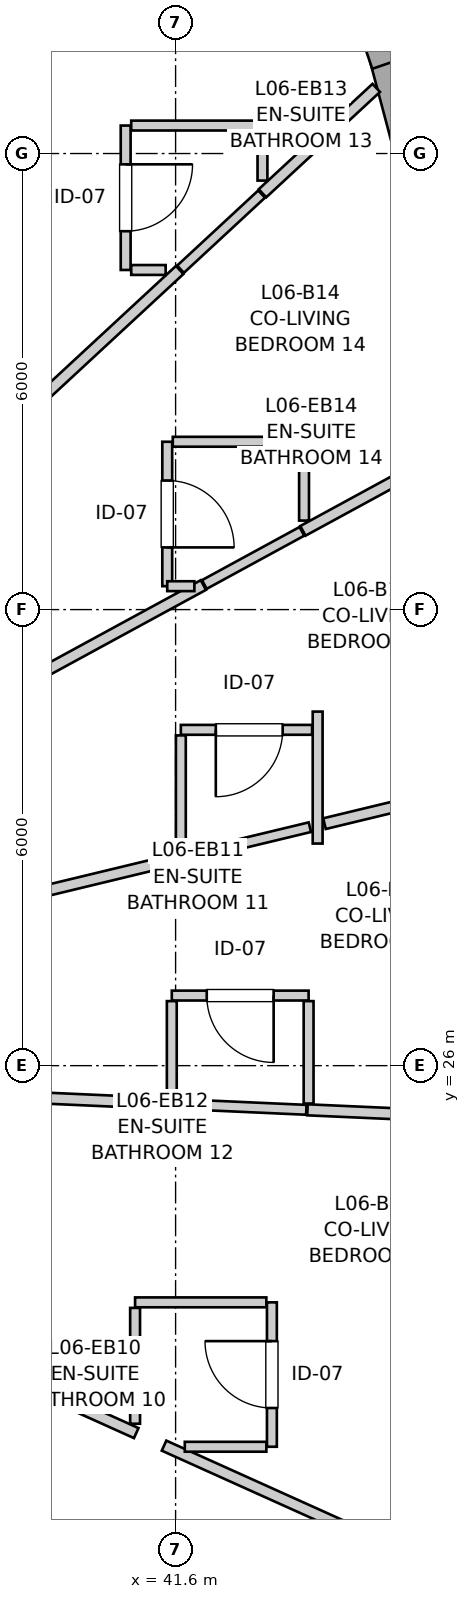
"""IFC4 building model, lengths in metres.
Left out: names, types, materials, properties, quantities, classifications, styles, units other than length and angle.
Written with IfcOpenShell. Run it as: python <this file> out.ifc"""

import sys

from ifc_helpers import new_model, si_unit, direction, frame, frame_2d, origin, place, context, subcontext, project, spatial, rectangle, extrude, source, transform, mapped, element, fill, save


model = new_model("IFC4")
c1 = context("Model", 3, precision=1e-05, world=origin(), true_north=direction((0.0, 1.0)))
c2 = subcontext(c1, "Body", "Model", "MODEL_VIEW")
j1 = project(units=[si_unit("LENGTHUNIT", "METRE"), si_unit("PLANEANGLEUNIT", "RADIAN")], contexts=[c1])
p1 = place(None, origin())
s1 = spatial("IfcSite", under=j1, at=p1, CompositionType="ELEMENT")
p2 = place(p1, origin())
s2 = spatial("IfcBuilding", under=s1, at=p2, CompositionType="ELEMENT")
p3 = place(p2, frame((0.0, 0.0, 23.8)))
s3 = spatial("IfcBuildingStorey", under=s2, at=p3, CompositionType="ELEMENT", Elevation=23.8)
p4 = place(p3, frame((45.214, 35.922, 0.0), z_axis=(0.0, 0.0, 1.0), x_axis=(-0.257081073508, 0.966389839373, 0.0)))
e1 = element("IfcWall", 1, at=p4, inside=s3, PredefinedType="SOLIDWALL", context=c2, shape_type="SweptSolid", body=[
    extrude(rectangle(XDim=3.449, YDim=0.35, at=frame_2d((1.725, 0.0))), origin(), (0.0, 0.0, 1.0), 2.415),
])
p5 = place(p4, frame((0.857, 0.0, 0.82)))
e2 = element("IfcOpeningElement", 2, at=p5, cuts=e1, PredefinedType="OPENING", context=c2, shape_type="SweptSolid", body=[
    extrude(rectangle(XDim=1.45, YDim=1.25, at=frame_2d((0.725, 0.625))), frame((0.0, 0.185, 0.0), z_axis=(0.0, -1.0, 0.0), x_axis=(1.0, 0.0, 0.0)), (0.0, 0.0, 1.0), 0.37),
])
p6 = place(p3, frame((44.353, 39.171, 0.0), z_axis=(0.0, 0.0, 1.0), x_axis=(-0.323604310653, 0.946192501623, 0.0)))
e3 = element("IfcWall", 3, at=p6, inside=s3, PredefinedType="SOLIDWALL", context=c2, shape_type="SweptSolid", body=[
    extrude(rectangle(XDim=3.243, YDim=0.35, at=frame_2d((1.621, 0.0))), origin(), (0.0, 0.0, 1.0), 2.415),
])
p7 = place(p6, frame((0.901, 0.0, 0.82)))
e4 = element("IfcOpeningElement", 4, at=p7, cuts=e3, PredefinedType="OPENING", context=c2, shape_type="SweptSolid", body=[
    extrude(rectangle(XDim=1.45, YDim=1.25, at=frame_2d((0.725, 0.625))), frame((0.0, 0.185, 0.0), z_axis=(0.0, -1.0, 0.0), x_axis=(1.0, 0.0, 0.0)), (0.0, 0.0, 1.0), 0.37),
])
p8 = place(p3, frame((42.867, 20.986, 0.0), z_axis=(0.0, 0.0, 1.0), x_axis=(0.0, 1.0, 0.0)))
e5 = element("IfcWall", 5, at=p8, inside=s3, PredefinedType="PARTITIONING", context=c2, shape_type="SweptSolid", body=[
    extrude(rectangle(XDim=1.9, YDim=0.13, at=frame_2d((0.95, 0.0))), origin(), (0.0, 0.0, 1.0), 2.503),
])
p9 = place(p8, frame((0.51, 0.0, 0.0)))
e6 = element("IfcOpeningElement", 6, at=p9, cuts=e5, PredefinedType="OPENING", context=c2, shape_type="SweptSolid", body=[
    extrude(rectangle(XDim=0.88, YDim=2.05, at=frame_2d((0.44, 1.025))), frame((0.0, 0.075, 0.0), z_axis=(0.0, -1.0, 0.0), x_axis=(1.0, 0.0, 0.0)), (0.0, 0.0, 1.0), 0.15),
])
p10 = place(p3, frame((40.943, 38.368, 0.0), z_axis=(0.0, 0.0, 1.0), x_axis=(0.0, -1.0, 0.0)))
e7 = element("IfcWall", 7, at=p10, inside=s3, PredefinedType="PARTITIONING", context=c2, shape_type="SweptSolid", body=[
    extrude(rectangle(XDim=1.9, YDim=0.13, at=frame_2d((0.95, 0.0))), origin(), (0.0, 0.0, 1.0), 2.935),
])
p11 = place(p10, frame((0.51, 0.0, 0.0)))
e8 = element("IfcOpeningElement", 8, at=p11, cuts=e7, PredefinedType="OPENING", context=c2, shape_type="SweptSolid", body=[
    extrude(rectangle(XDim=0.88, YDim=2.05, at=frame_2d((0.44, 1.025))), frame((0.0, 0.075, 0.0), z_axis=(0.0, -1.0, 0.0), x_axis=(1.0, 0.0, 0.0)), (0.0, 0.0, 1.0), 0.15),
])
p12 = place(p3, frame((41.49, 34.208, 0.0), z_axis=(0.0, 0.0, 1.0), x_axis=(0.0, -1.0, 0.0)))
e9 = element("IfcWall", 9, at=p12, inside=s3, PredefinedType="PARTITIONING", context=c2, shape_type="SweptSolid", body=[
    extrude(rectangle(XDim=1.9, YDim=0.13, at=frame_2d((0.95, 0.0))), origin(), (0.0, 0.0, 1.0), 2.935),
])
p13 = place(p12, frame((0.51, 0.0, 0.0)))
e10 = element("IfcOpeningElement", 10, at=p13, cuts=e9, PredefinedType="OPENING", context=c2, shape_type="SweptSolid", body=[
    extrude(rectangle(XDim=0.88, YDim=2.05, at=frame_2d((0.44, 1.025))), frame((0.0, 0.075, 0.0), z_axis=(0.0, -1.0, 0.0), x_axis=(1.0, 0.0, 0.0)), (0.0, 0.0, 1.0), 0.15),
])
p14 = place(p3, frame((43.396, 30.418, 0.0), z_axis=(0.0, 0.0, 1.0), x_axis=(-1.0, 0.0, 0.0)))
e11 = element("IfcWall", 11, at=p14, inside=s3, PredefinedType="PARTITIONING", context=c2, shape_type="SweptSolid", body=[
    extrude(rectangle(XDim=1.727, YDim=0.13, at=frame_2d((0.864, 0.0))), origin(), (0.0, 0.0, 1.0), 2.935),
])
p15 = place(p14, frame((0.387, 0.0, 0.0)))
e12 = element("IfcOpeningElement", 12, at=p15, cuts=e11, PredefinedType="OPENING", context=c2, shape_type="SweptSolid", body=[
    extrude(rectangle(XDim=0.88, YDim=2.05, at=frame_2d((0.44, 1.025))), frame((0.0, 0.075, 0.0), z_axis=(0.0, -1.0, 0.0), x_axis=(1.0, 0.0, 0.0)), (0.0, 0.0, 1.0), 0.15),
])
p16 = place(p3, frame((43.35, 26.922, 0.0), z_axis=(0.0, 0.0, 1.0), x_axis=(-1.0, 0.0, 0.0)))
e13 = element("IfcWall", 13, at=p16, inside=s3, PredefinedType="PARTITIONING", context=c2, shape_type="SweptSolid", body=[
    extrude(rectangle(XDim=1.8, YDim=0.13, at=frame_2d((0.9, 0.0))), origin(), (0.0, 0.0, 1.0), 2.935),
])
p17 = place(p16, frame((0.46, 0.0, 0.0)))
e14 = element("IfcOpeningElement", 14, at=p17, cuts=e13, PredefinedType="OPENING", context=c2, shape_type="SweptSolid", body=[
    extrude(rectangle(XDim=0.88, YDim=2.05, at=frame_2d((0.44, 1.025))), frame((0.0, 0.075, 0.0), z_axis=(0.0, -1.0, 0.0), x_axis=(1.0, 0.0, 0.0)), (0.0, 0.0, 1.0), 0.15),
])
p18 = place(p3, frame((35.852, 36.7, 0.0), z_axis=(0.0, 0.0, 1.0), x_axis=(0.457258091214, 0.889334041865, 0.0)))
e15 = element("IfcWall", 15, at=p18, inside=s3, PredefinedType="PARTITIONING", context=c2, shape_type="SweptSolid", body=[
    extrude(rectangle(XDim=11.227, YDim=0.145, at=frame_2d((5.613, 0.0))), origin(), (0.0, 0.0, 1.0), 2.935),
])
p19 = place(p3, frame((37.943, 36.708, 0.0), z_axis=(0.0, 0.0, 1.0), x_axis=(0.578429476704, 0.81573239514, 0.0)))
e16 = element("IfcWall", 16, at=p19, inside=s3, PredefinedType="PARTITIONING", context=c2, shape_type="SweptSolid", body=[
    extrude(rectangle(XDim=8.447, YDim=0.145, at=frame_2d((4.223, 0.0))), origin(), (0.0, 0.0, 1.0), 2.935),
])
p20 = place(p3, frame((41.448, 21.001, 0.0), z_axis=(0.0, 0.0, 1.0), x_axis=(0.911733501253, -0.410782208346, 0.0)))
e17 = element("IfcWall", 17, at=p20, inside=s3, PredefinedType="PARTITIONING", context=c2, shape_type="SweptSolid", body=[
    extrude(rectangle(XDim=4.546, YDim=0.145, at=frame_2d((2.273, 0.0))), origin(), (0.0, 0.0, 1.0), 2.103),
])
p21 = place(p3, frame((38.815, 33.839, 0.0), z_axis=(0.0, 0.0, 1.0), x_axis=(0.733718730688, 0.67945332749, 0.0)))
e18 = element("IfcWall", 18, at=p21, inside=s3, PredefinedType="PARTITIONING", context=c2, shape_type="SweptSolid", body=[
    extrude(rectangle(XDim=3.869, YDim=0.145, at=frame_2d((1.935, 0.0))), origin(), (0.0, 0.0, 1.0), 2.935),
])
p22 = place(p3, frame((38.802, 30.601, 0.0), z_axis=(0.0, 0.0, 1.0), x_axis=(0.878335610987, 0.478044510973, 0.0)))
e19 = element("IfcWall", 19, at=p22, inside=s3, PredefinedType="PARTITIONING", context=c2, shape_type="SweptSolid", body=[
    extrude(rectangle(XDim=3.602, YDim=0.145, at=frame_2d((1.801, 0.0))), origin(), (0.0, 0.0, 1.0), 2.103),
])
p23 = place(p3, frame((38.785, 28.033, 0.0), z_axis=(0.0, 0.0, 1.0), x_axis=(0.972108739033, 0.234530593943, 0.0)))
e20 = element("IfcWall", 20, at=p23, inside=s3, PredefinedType="PARTITIONING", context=c2, shape_type="SweptSolid", body=[
    extrude(rectangle(XDim=2.967, YDim=0.145, at=frame_2d((1.483, 0.0))), origin(), (0.0, 0.0, 1.0), 2.935),
])
p24 = place(p3, frame((38.771, 25.623, 0.0), z_axis=(0.0, 0.0, 1.0), x_axis=(0.999004404192, -0.044611662199, 0.0)))
e21 = element("IfcWall", 21, at=p24, inside=s3, PredefinedType="PARTITIONING", context=c2, shape_type="SweptSolid", body=[
    extrude(rectangle(XDim=2.796, YDim=0.145, at=frame_2d((1.398, 0.0))), origin(), (0.0, 0.0, 1.0), 2.935),
])
p25 = place(p3, frame((43.335, 25.419, 0.0), z_axis=(0.0, 0.0, 1.0), x_axis=(0.999002708223, -0.04464962444, 0.0)))
e22 = element("IfcWall", 22, at=p25, inside=s3, PredefinedType="PARTITIONING", context=c2, shape_type="SweptSolid", body=[
    extrude(rectangle(XDim=2.805, YDim=0.145, at=frame_2d((1.402, 0.0))), origin(), (0.0, 0.0, 1.0), 2.935),
])
p26 = place(p3, frame((38.797, 22.195, 0.0), z_axis=(0.0, 0.0, 1.0), x_axis=(0.911759201305, -0.410725162165, 0.0)))
e23 = element("IfcWall", 23, at=p26, inside=s3, PredefinedType="PARTITIONING", context=c2, shape_type="SweptSolid", body=[
    extrude(rectangle(XDim=2.506, YDim=0.145, at=frame_2d((1.253, 0.0))), origin(), (0.0, 0.0, 1.0), 2.935),
])
p27 = place(p3, frame((43.559, 29.184, 0.0), z_axis=(0.0, 0.0, 1.0), x_axis=(0.972124665715, 0.23446456941, 0.0)))
e24 = element("IfcWall", 24, at=p27, inside=s3, PredefinedType="PARTITIONING", context=c2, shape_type="SweptSolid", body=[
    extrude(rectangle(XDim=2.487, YDim=0.145, at=frame_2d((1.243, 0.0))), origin(), (0.0, 0.0, 1.0), 2.935),
])
p28 = place(p3, frame((43.275, 33.036, 0.0), z_axis=(0.0, 0.0, 1.0), x_axis=(0.878237509553, 0.478224713721, 0.0)))
e25 = element("IfcWall", 25, at=p28, inside=s3, PredefinedType="PARTITIONING", context=c2, shape_type="SweptSolid", body=[
    extrude(rectangle(XDim=2.372, YDim=0.145, at=frame_2d((1.186, 0.0))), origin(), (0.0, 0.0, 1.0), 2.935),
])
p29 = place(p3, frame((42.743, 37.477, 0.0), z_axis=(0.0, 0.0, 1.0), x_axis=(0.73374741774, 0.679422347999, 0.0)))
e26 = element("IfcWall", 26, at=p29, inside=s3, PredefinedType="PARTITIONING", context=c2, shape_type="SweptSolid", body=[
    extrude(rectangle(XDim=2.04, YDim=0.145, at=frame_2d((1.02, 0.0))), origin(), (0.0, 0.0, 1.0), 2.935),
])
p30 = place(p3, frame((41.684, 28.732, 0.0), z_axis=(0.0, 0.0, 1.0), x_axis=(0.972269386076, 0.233863722924, 0.0)))
e27 = element("IfcWall", 27, at=p30, inside=s3, PredefinedType="PARTITIONING", context=c2, shape_type="SweptSolid", body=[
    extrude(rectangle(XDim=1.731, YDim=0.13, at=frame_2d((0.865, 0.0))), origin(), (0.0, 0.0, 1.0), 2.935),
])
p31 = place(p3, frame((41.016, 38.368, 0.0), z_axis=(0.0, 0.0, 1.0), x_axis=(1.0, 0.0, 0.0)))
e28 = element("IfcWall", 28, at=p31, inside=s3, PredefinedType="PARTITIONING", context=c2, shape_type="SweptSolid", body=[
    extrude(rectangle(XDim=1.727, YDim=0.13, at=frame_2d((0.863, 0.0))), origin(), (0.0, 0.0, 1.0), 2.935),
])
for number, where, z_axis, x_axis in (
    (29, (41.067, 22.886, 0.0), (0.0, 0.0, 1.0), (1.0, 0.0, 0.0)),
    (30, (41.563, 34.208, 0.0), (0.0, 0.0, 1.0), (1.0, 0.0, 0.0)),
):
    element("IfcWall", number, at=place(p3, frame(where, z_axis=z_axis, x_axis=x_axis)), inside=s3, PredefinedType="PARTITIONING", context=c2, shape_type="SweptSolid", body=[
        extrude(rectangle(XDim=1.727, YDim=0.13, at=frame_2d((0.864, 0.0))), origin(), (0.0, 0.0, 1.0), 2.935),
    ])
p32 = place(p3, frame((41.58, 25.497, 0.0), z_axis=(0.0, 0.0, 1.0), x_axis=(0.998993531001, -0.04485448715, 0.0)))
e31 = element("IfcWall", 31, at=p32, inside=s3, PredefinedType="PARTITIONING", context=c2, shape_type="SweptSolid", body=[
    extrude(rectangle(XDim=1.742, YDim=0.13, at=frame_2d((0.871, 0.0))), origin(), (0.0, 0.0, 1.0), 2.935),
])
p33 = place(p3, frame((41.067, 21.289, 0.0), z_axis=(0.0, 0.0, 1.0), x_axis=(0.0, 1.0, 0.0)))
e32 = element("IfcWall", 32, at=p33, inside=s3, PredefinedType="PARTITIONING", context=c2, shape_type="SweptSolid", body=[
    extrude(rectangle(XDim=1.524, YDim=0.13, at=frame_2d((0.762, 0.0))), origin(), (0.0, 0.0, 1.0), 2.935),
])
p34 = place(p3, frame((41.669, 28.827, 0.0), z_axis=(0.0, 0.0, 1.0), x_axis=(0.0, 1.0, 0.0)))
e33 = element("IfcWall", 33, at=p34, inside=s3, PredefinedType="PARTITIONING", context=c2, shape_type="SweptSolid", body=[
    extrude(rectangle(XDim=1.518, YDim=0.13, at=frame_2d((0.759, 0.0))), origin(), (0.0, 0.0, 1.0), 2.935),
])
p35 = place(p3, frame((43.35, 25.501, 0.0), z_axis=(0.0, 0.0, 1.0), x_axis=(0.0, 1.0, 0.0)))
e34 = element("IfcWall", 34, at=p35, inside=s3, PredefinedType="PARTITIONING", context=c2, shape_type="SweptSolid", body=[
    extrude(rectangle(XDim=1.348, YDim=0.13, at=frame_2d((0.674, 0.0))), origin(), (0.0, 0.0, 1.0), 2.503),
])
p36 = place(p3, frame((41.978, 32.33, 0.0), z_axis=(0.0, 0.0, 1.0), x_axis=(0.878138043068, 0.478407334097, 0.0)))
e35 = element("IfcWall", 35, at=p36, inside=s3, PredefinedType="PARTITIONING", context=c2, shape_type="SweptSolid", body=[
    extrude(rectangle(XDim=1.462, YDim=0.13, at=frame_2d((0.731, 0.0))), origin(), (0.0, 0.0, 1.0), 2.935),
])
p37 = place(p3, frame((41.665, 36.478, 0.0), z_axis=(0.0, 0.0, 1.0), x_axis=(0.733534386117, 0.679652340821, 0.0)))
e36 = element("IfcWall", 36, at=p37, inside=s3, PredefinedType="PARTITIONING", context=c2, shape_type="SweptSolid", body=[
    extrude(rectangle(XDim=1.454, YDim=0.13, at=frame_2d((0.727, 0.0))), origin(), (0.0, 0.0, 1.0), 2.935),
])
p38 = place(p3, frame((41.55, 25.583, 0.0), z_axis=(0.0, 0.0, 1.0), x_axis=(0.0, 1.0, 0.0)))
e37 = element("IfcWall", 37, at=p38, inside=s3, PredefinedType="PARTITIONING", context=c2, shape_type="SweptSolid", body=[
    extrude(rectangle(XDim=1.267, YDim=0.13, at=frame_2d((0.633, 0.0))), origin(), (0.0, 0.0, 1.0), 2.935),
])
p39 = place(p3, frame((41.721, 20.986, 0.0), z_axis=(0.0, 0.0, 1.0), x_axis=(1.0, 0.0, 0.0)))
e38 = element("IfcWall", 38, at=p39, inside=s3, PredefinedType="PARTITIONING", context=c2, shape_type="SweptSolid", body=[
    extrude(rectangle(XDim=1.073, YDim=0.13, at=frame_2d((0.537, 0.0))), origin(), (0.0, 0.0, 1.0), 2.935),
])
p40 = place(p3, frame((43.469, 28.922, 0.0), z_axis=(0.0, 0.0, 1.0), x_axis=(0.0, 1.0, 0.0)))
e39 = element("IfcWall", 39, at=p40, inside=s3, PredefinedType="PARTITIONING", context=c2, shape_type="SweptSolid", body=[
    extrude(rectangle(XDim=1.736, YDim=0.13, at=frame_2d((0.868, 0.0))), origin(), (0.0, 0.0, 1.0), 2.935),
])
p41 = place(p3, frame((43.29, 33.171, 0.0), z_axis=(0.0, 0.0, 1.0), x_axis=(0.0, 1.0, 0.0)))
e40 = element("IfcWall", 40, at=p41, inside=s3, PredefinedType="PARTITIONING", context=c2, shape_type="SweptSolid", body=[
    extrude(rectangle(XDim=0.964, YDim=0.13, at=frame_2d((0.482, 0.0))), origin(), (0.0, 0.0, 1.0), 2.935),
])
p42 = place(p3, frame((42.743, 37.644, 0.0), z_axis=(0.0, 0.0, 1.0), x_axis=(0.0, 1.0, 0.0)))
e41 = element("IfcWall", 41, at=p42, inside=s3, PredefinedType="PARTITIONING", context=c2, shape_type="SweptSolid", body=[
    extrude(rectangle(XDim=0.651, YDim=0.13, at=frame_2d((0.325, 0.0))), origin(), (0.0, 0.0, 1.0), 2.935),
])
p43 = place(p3, frame((41.016, 36.468, 0.0), z_axis=(0.0, 0.0, 1.0), x_axis=(1.0, 0.0, 0.0)))
e42 = element("IfcWall", 42, at=p43, inside=s3, PredefinedType="PARTITIONING", context=c2, shape_type="SweptSolid", body=[
    extrude(rectangle(XDim=0.453, YDim=0.13, at=frame_2d((0.227, 0.0))), origin(), (0.0, 0.0, 1.0), 2.935),
])
p44 = place(p3, frame((41.49, 32.308, 0.0), z_axis=(0.0, 0.0, 1.0), x_axis=(1.0, 0.0, 0.0)))
e43 = element("IfcWall", 43, at=p44, inside=s3, PredefinedType="PARTITIONING", context=c2, shape_type="SweptSolid", body=[
    extrude(rectangle(XDim=0.357, YDim=0.13, at=frame_2d((0.178, 0.0))), origin(), (0.0, 0.0, 1.0), 2.935),
])
m1 = source(origin(), c2, "Body", "SweptSolid", [
    extrude(rectangle(XDim=0.88, YDim=2.05, at=frame_2d((0.44, 1.025))), frame((0.0, 0.025, 0.0), z_axis=(0.0, -1.0, 0.0), x_axis=(1.0, 0.0, 0.0)), (0.0, 0.0, 1.0), 0.05),
])
p45 = place(p9, origin())
e44 = element("IfcDoor", 44, at=p45, inside=s3, OperationType="SINGLE_SWING_RIGHT", PredefinedType="DOOR", context=c2, shape_type="MappedRepresentation", body=[
    mapped(m1, transform((0.0, 0.0, 0.0), x_axis=(1.0, 0.0, 0.0), y_axis=(0.0, 1.0, 0.0), z_axis=(0.0, 0.0, 1.0), scale=1.0)),
])
fill(e6, e44)
p46 = place(p11, origin())
e45 = element("IfcDoor", 45, at=p46, inside=s3, OperationType="SINGLE_SWING_LEFT", PredefinedType="DOOR", context=c2, shape_type="MappedRepresentation", body=[
    mapped(m1, transform((0.0, 0.0, 0.0), x_axis=(1.0, 0.0, 0.0), y_axis=(0.0, 1.0, 0.0), z_axis=(0.0, 0.0, 1.0), scale=1.0)),
])
fill(e8, e45)
p47 = place(p13, origin())
e46 = element("IfcDoor", 46, at=p47, inside=s3, OperationType="SINGLE_SWING_RIGHT", PredefinedType="DOOR", context=c2, shape_type="MappedRepresentation", body=[
    mapped(m1, transform((0.0, 0.0, 0.0), x_axis=(1.0, 0.0, 0.0), y_axis=(0.0, 1.0, 0.0), z_axis=(0.0, 0.0, 1.0), scale=1.0)),
])
fill(e10, e46)
p48 = place(p15, origin())
e47 = element("IfcDoor", 47, at=p48, inside=s3, OperationType="SINGLE_SWING_RIGHT", PredefinedType="DOOR", context=c2, shape_type="MappedRepresentation", body=[
    mapped(m1, transform((0.0, 0.0, 0.0), x_axis=(1.0, 0.0, 0.0), y_axis=(0.0, 1.0, 0.0), z_axis=(0.0, 0.0, 1.0), scale=1.0)),
])
fill(e12, e47)
p49 = place(p17, origin())
e48 = element("IfcDoor", 48, at=p49, inside=s3, OperationType="SINGLE_SWING_LEFT", PredefinedType="DOOR", context=c2, shape_type="MappedRepresentation", body=[
    mapped(m1, transform((0.0, 0.0, 0.0), x_axis=(1.0, 0.0, 0.0), y_axis=(0.0, 1.0, 0.0), z_axis=(0.0, 0.0, 1.0), scale=1.0)),
])
fill(e14, e48)
save(model, sys.argv[1])
